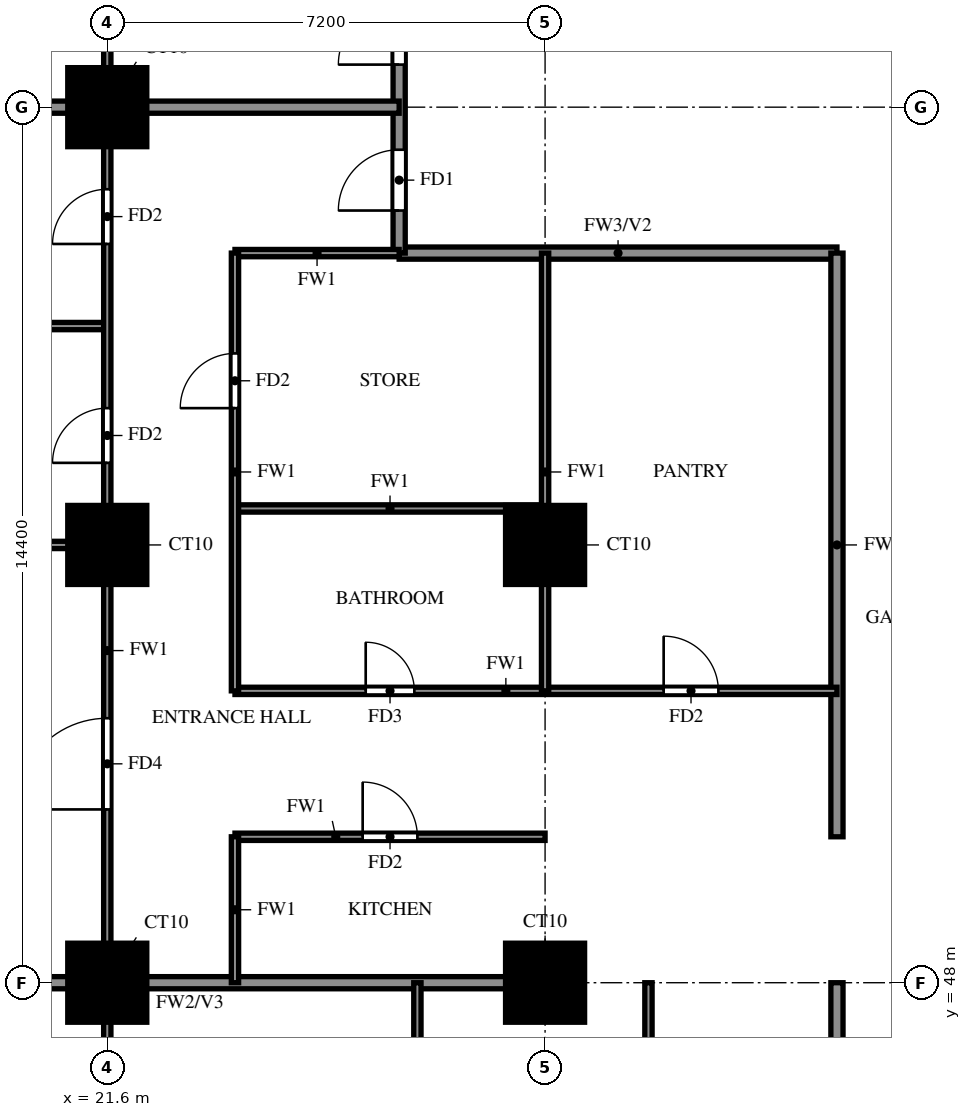
"""IFC4 building model, lengths in metres.
Left out: names, types, materials, properties, quantities, classifications, styles, units other than length and angle.
Written with IfcOpenShell. Run it as: python <this file> out.ifc"""

import sys

from ifc_helpers import new_model, si_unit, direction, frame, frame_2d, origin, origin_2d, place, context, subcontext, project, spatial, rectangle, extrude, source, transform, mapped, element, fill, save


model = new_model("IFC4")
c1 = context("Model", 3, precision=1e-05, world=origin(), true_north=direction((0.0, 1.0)))
c2 = subcontext(c1, "Body", "Model", "MODEL_VIEW")
j1 = project(units=[si_unit("LENGTHUNIT", "METRE"), si_unit("PLANEANGLEUNIT", "RADIAN")], contexts=[c1])
p1 = place(None, origin())
s1 = spatial("IfcSite", under=j1, at=p1, CompositionType="ELEMENT")
p2 = place(p1, origin())
s2 = spatial("IfcBuilding", under=s1, at=p2, CompositionType="ELEMENT")
p3 = place(p2, frame((0.0, 0.0, 72.5)))
s3 = spatial("IfcBuildingStorey", under=s2, at=p3, CompositionType="ELEMENT", Elevation=72.5)
m1 = source(origin(), c2, "Body", "SweptSolid", [
    extrude(rectangle(XDim=1.3, YDim=1.3, at=origin_2d()), origin(), (0.0, 0.0, 1.0), 3.18),
])
for number, where, z_axis, x_axis in (
    (1, (21.6, 48.0, 0.0), (0.0, 0.0, 1.0), (1.0, 0.0, 0.0)),
    (2, (28.8, 48.0, 0.0), (0.0, 0.0, 1.0), (1.0, 0.0, 0.0)),
    (3, (21.6, 55.2, 0.0), (0.0, 0.0, 1.0), (1.0, 0.0, 0.0)),
    (4, (28.8, 55.2, 0.0), (0.0, 0.0, 1.0), (1.0, 0.0, 0.0)),
    (5, (21.6, 62.4, 0.0), (0.0, 0.0, 1.0), (1.0, 0.0, 0.0)),
):
    element("IfcColumn", number, at=place(p3, frame(where, z_axis=z_axis, x_axis=x_axis)), inside=s3, PredefinedType="COLUMN", context=c2, shape_type="MappedRepresentation", body=[
        mapped(m1, transform((0.0, 0.0, 0.0))),
    ])
p4 = place(p3, frame((26.4, 60.0, 0.0), z_axis=(0.0, 0.0, 1.0), x_axis=(1.0, 0.0, 0.0)))
e6 = element("IfcWall", 6, at=p4, inside=s3, PredefinedType="SOLIDWALL", context=c2, shape_type="SweptSolid", body=[
    extrude(rectangle(XDim=7.2, YDim=0.2, at=frame_2d((3.6, 0.0))), origin(), (0.0, 0.0, 1.0), 3.18),
])
p5 = place(p3, frame((26.4, 60.0, 0.0), z_axis=(0.0, 0.0, 1.0), x_axis=(0.0, 1.0, 0.0)))
e7 = element("IfcWall", 7, at=p5, inside=s3, PredefinedType="SOLIDWALL", context=c2, shape_type="SweptSolid", body=[
    extrude(rectangle(XDim=9.45, YDim=0.2, at=frame_2d((4.725, 0.0))), origin(), (0.0, 0.0, 1.0), 3.18),
])
p6 = place(p5, frame((0.7, 0.0, 0.0)))
e8 = element("IfcOpeningElement", 8, at=p6, cuts=e7, PredefinedType="OPENING", context=c2, shape_type="SweptSolid", body=[
    extrude(rectangle(XDim=1.0, YDim=2.1, at=frame_2d((0.5, 1.05))), frame((0.0, 0.11, 0.0), z_axis=(0.0, -1.0, 0.0), x_axis=(1.0, 0.0, 0.0)), (0.0, 0.0, 1.0), 0.22),
])
p7 = place(p5, frame((3.1, 0.0, 0.0)))
e9 = element("IfcOpeningElement", 9, at=p7, cuts=e7, PredefinedType="OPENING", context=c2, shape_type="SweptSolid", body=[
    extrude(rectangle(XDim=1.0, YDim=2.1, at=frame_2d((0.5, 1.05))), frame((0.0, 0.11, 0.0), z_axis=(0.0, -1.0, 0.0), x_axis=(1.0, 0.0, 0.0)), (0.0, 0.0, 1.0), 0.22),
])
p8 = place(p3, frame((33.6, 45.6, 0.0), z_axis=(0.0, 0.0, 1.0), x_axis=(0.0, 1.0, 0.0)))
e10 = element("IfcWall", 10, at=p8, inside=s3, PredefinedType="SOLIDWALL", context=c2, shape_type="SweptSolid", body=[
    extrude(rectangle(XDim=2.4, YDim=0.2, at=frame_2d((1.2, 0.0))), origin(), (0.0, 0.0, 1.0), 3.18),
])
p9 = place(p3, frame((33.6, 50.4, 0.0), z_axis=(0.0, 0.0, 1.0), x_axis=(0.0, 1.0, 0.0)))
e11 = element("IfcWall", 11, at=p9, inside=s3, PredefinedType="SOLIDWALL", context=c2, shape_type="SweptSolid", body=[
    extrude(rectangle(XDim=9.6, YDim=0.2, at=frame_2d((4.8, 0.0))), origin(), (0.0, 0.0, 1.0), 3.18),
])
p10 = place(p3, frame((14.525, 48.0, 0.0), z_axis=(0.0, 0.0, 1.0), x_axis=(1.0, 0.0, 0.0)))
e12 = element("IfcWall", 12, at=p10, inside=s3, PredefinedType="SOLIDWALL", context=c2, shape_type="SweptSolid", body=[
    extrude(rectangle(XDim=14.275, YDim=0.2, at=frame_2d((7.138, 0.0))), origin(), (0.0, 0.0, 1.0), 3.18),
])
p11 = place(p3, frame((14.525, 62.4, 0.0), z_axis=(0.0, 0.0, 1.0), x_axis=(1.0, 0.0, 0.0)))
e13 = element("IfcWall", 13, at=p11, inside=s3, PredefinedType="SOLIDWALL", context=c2, shape_type="SweptSolid", body=[
    extrude(rectangle(XDim=11.875, YDim=0.2, at=frame_2d((5.938, 0.0))), origin(), (0.0, 0.0, 1.0), 3.18),
])
p12 = place(p3, frame((23.7, 50.4, 0.0), z_axis=(0.0, 0.0, 1.0), x_axis=(1.0, 0.0, 0.0)))
e14 = element("IfcWall", 14, at=p12, inside=s3, PredefinedType="PARTITIONING", context=c2, shape_type="SweptSolid", body=[
    extrude(rectangle(XDim=5.1, YDim=0.12, at=frame_2d((2.55, 0.0))), origin(), (0.0, 0.0, 1.0), 3.18),
])
p13 = place(p12, frame((2.1, 0.0, 0.0)))
e15 = element("IfcOpeningElement", 15, at=p13, cuts=e14, PredefinedType="OPENING", context=c2, shape_type="SweptSolid", body=[
    extrude(rectangle(XDim=0.9, YDim=2.1, at=frame_2d((0.45, 1.05))), frame((0.0, 0.07, 0.0), z_axis=(0.0, -1.0, 0.0), x_axis=(1.0, 0.0, 0.0)), (0.0, 0.0, 1.0), 0.14),
])
p14 = place(p3, frame((23.7, 52.8, 0.0), z_axis=(0.0, 0.0, 1.0), x_axis=(1.0, 0.0, 0.0)))
e16 = element("IfcWall", 16, at=p14, inside=s3, PredefinedType="PARTITIONING", context=c2, shape_type="SweptSolid", body=[
    extrude(rectangle(XDim=9.9, YDim=0.12, at=frame_2d((4.95, 0.0))), origin(), (0.0, 0.0, 1.0), 3.18),
])
p15 = place(p14, frame((2.15, 0.0, 0.0)))
e17 = element("IfcOpeningElement", 17, at=p15, cuts=e16, PredefinedType="OPENING", context=c2, shape_type="SweptSolid", body=[
    extrude(rectangle(XDim=0.8, YDim=2.1, at=frame_2d((0.4, 1.05))), frame((0.0, 0.07, 0.0), z_axis=(0.0, -1.0, 0.0), x_axis=(1.0, 0.0, 0.0)), (0.0, 0.0, 1.0), 0.14),
])
p16 = place(p14, frame((7.05, 0.0, 0.0)))
e18 = element("IfcOpeningElement", 18, at=p16, cuts=e16, PredefinedType="OPENING", context=c2, shape_type="SweptSolid", body=[
    extrude(rectangle(XDim=0.9, YDim=2.1, at=frame_2d((0.45, 1.05))), frame((0.0, 0.07, 0.0), z_axis=(0.0, -1.0, 0.0), x_axis=(1.0, 0.0, 0.0)), (0.0, 0.0, 1.0), 0.14),
])
p17 = place(p3, frame((14.525, 55.2, 0.0), z_axis=(0.0, 0.0, 1.0), x_axis=(1.0, 0.0, 0.0)))
e19 = element("IfcWall", 19, at=p17, inside=s3, PredefinedType="PARTITIONING", context=c2, shape_type="SweptSolid", body=[
    extrude(rectangle(XDim=7.075, YDim=0.12, at=frame_2d((3.538, 0.0))), origin(), (0.0, 0.0, 1.0), 3.18),
])
p18 = place(p3, frame((23.7, 55.8, 0.0), z_axis=(0.0, 0.0, 1.0), x_axis=(1.0, 0.0, 0.0)))
e20 = element("IfcWall", 20, at=p18, inside=s3, PredefinedType="PARTITIONING", context=c2, shape_type="SweptSolid", body=[
    extrude(rectangle(XDim=5.1, YDim=0.12, at=frame_2d((2.55, 0.0))), origin(), (0.0, 0.0, 1.0), 3.18),
])
p19 = place(p3, frame((14.525, 58.8, 0.0), z_axis=(0.0, 0.0, 1.0), x_axis=(1.0, 0.0, 0.0)))
e21 = element("IfcWall", 21, at=p19, inside=s3, PredefinedType="PARTITIONING", context=c2, shape_type="SweptSolid", body=[
    extrude(rectangle(XDim=7.075, YDim=0.12, at=frame_2d((3.538, 0.0))), origin(), (0.0, 0.0, 1.0), 2.28),
])
p20 = place(p3, frame((23.7, 60.0, 0.0), z_axis=(0.0, 0.0, 1.0), x_axis=(1.0, 0.0, 0.0)))
e22 = element("IfcWall", 22, at=p20, inside=s3, PredefinedType="PARTITIONING", context=c2, shape_type="SweptSolid", body=[
    extrude(rectangle(XDim=2.7, YDim=0.12, at=frame_2d((1.35, 0.0))), origin(), (0.0, 0.0, 1.0), 3.18),
])
p21 = place(p3, frame((21.6, 33.725, 0.0), z_axis=(0.0, 0.0, 1.0), x_axis=(0.0, 1.0, 0.0)))
e23 = element("IfcWall", 23, at=p21, inside=s3, PredefinedType="PARTITIONING", context=c2, shape_type="SweptSolid", body=[
    extrude(rectangle(XDim=39.475, YDim=0.12, at=frame_2d((19.737, 0.0))), origin(), (0.0, 0.0, 1.0), 3.18),
])
p22 = place(p21, frame((7.775, 0.0, 0.0)))
e24 = element("IfcOpeningElement", 24, at=p22, cuts=e23, PredefinedType="OPENING", context=c2, shape_type="SweptSolid", body=[
    extrude(rectangle(XDim=0.9, YDim=2.1, at=frame_2d((0.45, 1.05))), frame((0.0, 0.07, 0.0), z_axis=(0.0, -1.0, 0.0), x_axis=(1.0, 0.0, 0.0)), (0.0, 0.0, 1.0), 0.14),
])
p23 = place(p21, frame((17.125, 0.0, 0.0)))
e25 = element("IfcOpeningElement", 25, at=p23, cuts=e23, PredefinedType="OPENING", context=c2, shape_type="SweptSolid", body=[
    extrude(rectangle(XDim=1.5, YDim=2.1, at=frame_2d((0.75, 1.05))), frame((0.0, 0.07, 0.0), z_axis=(0.0, -1.0, 0.0), x_axis=(1.0, 0.0, 0.0)), (0.0, 0.0, 1.0), 0.14),
])
p24 = place(p21, frame((22.825, 0.0, 0.0)))
e26 = element("IfcOpeningElement", 26, at=p24, cuts=e23, PredefinedType="OPENING", context=c2, shape_type="SweptSolid", body=[
    extrude(rectangle(XDim=0.9, YDim=2.1, at=frame_2d((0.45, 1.05))), frame((0.0, 0.07, 0.0), z_axis=(0.0, -1.0, 0.0), x_axis=(1.0, 0.0, 0.0)), (0.0, 0.0, 1.0), 0.14),
])
p25 = place(p21, frame((26.425, 0.0, 0.0)))
e27 = element("IfcOpeningElement", 27, at=p25, cuts=e23, PredefinedType="OPENING", context=c2, shape_type="SweptSolid", body=[
    extrude(rectangle(XDim=0.9, YDim=2.1, at=frame_2d((0.45, 1.05))), frame((0.0, 0.07, 0.0), z_axis=(0.0, -1.0, 0.0), x_axis=(1.0, 0.0, 0.0)), (0.0, 0.0, 1.0), 0.14),
])
p26 = place(p21, frame((30.025, 0.0, 0.0)))
e28 = element("IfcOpeningElement", 28, at=p26, cuts=e23, PredefinedType="OPENING", context=c2, shape_type="SweptSolid", body=[
    extrude(rectangle(XDim=0.9, YDim=2.1, at=frame_2d((0.45, 1.05))), frame((0.0, 0.07, 0.0), z_axis=(0.0, -1.0, 0.0), x_axis=(1.0, 0.0, 0.0)), (0.0, 0.0, 1.0), 0.14),
])
p27 = place(p21, frame((33.625, 0.0, 0.0)))
e29 = element("IfcOpeningElement", 29, at=p27, cuts=e23, PredefinedType="OPENING", context=c2, shape_type="SweptSolid", body=[
    extrude(rectangle(XDim=0.9, YDim=2.1, at=frame_2d((0.45, 1.05))), frame((0.0, 0.07, 0.0), z_axis=(0.0, -1.0, 0.0), x_axis=(1.0, 0.0, 0.0)), (0.0, 0.0, 1.0), 0.14),
])
p28 = place(p21, frame((37.225, 0.0, 0.0)))
e30 = element("IfcOpeningElement", 30, at=p28, cuts=e23, PredefinedType="OPENING", context=c2, shape_type="SweptSolid", body=[
    extrude(rectangle(XDim=0.9, YDim=2.1, at=frame_2d((0.45, 1.05))), frame((0.0, 0.07, 0.0), z_axis=(0.0, -1.0, 0.0), x_axis=(1.0, 0.0, 0.0)), (0.0, 0.0, 1.0), 0.14),
])
p29 = place(p3, frame((23.7, 48.0, 0.0), z_axis=(0.0, 0.0, 1.0), x_axis=(0.0, 1.0, 0.0)))
e31 = element("IfcWall", 31, at=p29, inside=s3, PredefinedType="PARTITIONING", context=c2, shape_type="SweptSolid", body=[
    extrude(rectangle(XDim=2.4, YDim=0.12, at=frame_2d((1.2, 0.0))), origin(), (0.0, 0.0, 1.0), 3.18),
])
p30 = place(p3, frame((23.7, 52.8, 0.0), z_axis=(0.0, 0.0, 1.0), x_axis=(0.0, 1.0, 0.0)))
e32 = element("IfcWall", 32, at=p30, inside=s3, PredefinedType="PARTITIONING", context=c2, shape_type="SweptSolid", body=[
    extrude(rectangle(XDim=7.2, YDim=0.12, at=frame_2d((3.6, 0.0))), origin(), (0.0, 0.0, 1.0), 3.18),
])
p31 = place(p30, frame((4.65, 0.0, 0.0)))
e33 = element("IfcOpeningElement", 33, at=p31, cuts=e32, PredefinedType="OPENING", context=c2, shape_type="SweptSolid", body=[
    extrude(rectangle(XDim=0.9, YDim=2.1, at=frame_2d((0.45, 1.05))), frame((0.0, 0.07, 0.0), z_axis=(0.0, -1.0, 0.0), x_axis=(1.0, 0.0, 0.0)), (0.0, 0.0, 1.0), 0.14),
])
p32 = place(p3, frame((26.7, 42.9, 0.0), z_axis=(0.0, 0.0, 1.0), x_axis=(0.0, 1.0, 0.0)))
e34 = element("IfcWall", 34, at=p32, inside=s3, PredefinedType="PARTITIONING", context=c2, shape_type="SweptSolid", body=[
    extrude(rectangle(XDim=5.1, YDim=0.12, at=frame_2d((2.55, 0.0))), origin(), (0.0, 0.0, 1.0), 3.18),
])
p33 = place(p3, frame((28.8, 52.8, 0.0), z_axis=(0.0, 0.0, 1.0), x_axis=(0.0, 1.0, 0.0)))
e35 = element("IfcWall", 35, at=p33, inside=s3, PredefinedType="PARTITIONING", context=c2, shape_type="SweptSolid", body=[
    extrude(rectangle(XDim=7.2, YDim=0.12, at=frame_2d((3.6, 0.0))), origin(), (0.0, 0.0, 1.0), 3.18),
])
p34 = place(p3, frame((30.5, 42.9, 0.0), z_axis=(0.0, 0.0, 1.0), x_axis=(0.0, 1.0, 0.0)))
e36 = element("IfcWall", 36, at=p34, inside=s3, PredefinedType="PARTITIONING", context=c2, shape_type="SweptSolid", body=[
    extrude(rectangle(XDim=5.1, YDim=0.12, at=frame_2d((2.55, 0.0))), origin(), (0.0, 0.0, 1.0), 3.18),
])
p35 = place(p6, origin())
e37 = element("IfcDoor", 37, at=p35, inside=s3, OperationType="SINGLE_SWING_RIGHT", PredefinedType="DOOR", context=c2, shape_type="SweptSolid", body=[
    extrude(rectangle(XDim=1.0, YDim=2.1, at=frame_2d((0.5, 1.05))), frame((0.0, 0.025, 0.0), z_axis=(0.0, -1.0, 0.0), x_axis=(1.0, 0.0, 0.0)), (0.0, 0.0, 1.0), 0.05),
])
fill(e8, e37)
p36 = place(p23, origin())
e38 = element("IfcDoor", 38, at=p36, inside=s3, OperationType="SINGLE_SWING_LEFT", PredefinedType="DOOR", context=c2, shape_type="SweptSolid", body=[
    extrude(rectangle(XDim=1.5, YDim=2.1, at=frame_2d((0.75, 1.05))), frame((0.0, 0.025, 0.0), z_axis=(0.0, -1.0, 0.0), x_axis=(1.0, 0.0, 0.0)), (0.0, 0.0, 1.0), 0.05),
])
fill(e25, e38)
p37 = place(p24, origin())
e39 = element("IfcDoor", 39, at=p37, inside=s3, OperationType="SINGLE_SWING_LEFT", PredefinedType="DOOR", context=c2, shape_type="SweptSolid", body=[
    extrude(rectangle(XDim=0.9, YDim=2.1, at=frame_2d((0.45, 1.05))), frame((0.0, 0.025, 0.0), z_axis=(0.0, -1.0, 0.0), x_axis=(1.0, 0.0, 0.0)), (0.0, 0.0, 1.0), 0.05),
])
fill(e26, e39)
p38 = place(p25, origin())
e40 = element("IfcDoor", 40, at=p38, inside=s3, OperationType="SINGLE_SWING_RIGHT", PredefinedType="DOOR", context=c2, shape_type="SweptSolid", body=[
    extrude(rectangle(XDim=0.9, YDim=2.1, at=frame_2d((0.45, 1.05))), frame((0.0, 0.025, 0.0), z_axis=(0.0, -1.0, 0.0), x_axis=(1.0, 0.0, 0.0)), (0.0, 0.0, 1.0), 0.05),
])
fill(e27, e40)
p39 = place(p13, origin())
e41 = element("IfcDoor", 41, at=p39, inside=s3, OperationType="SINGLE_SWING_LEFT", PredefinedType="DOOR", context=c2, shape_type="SweptSolid", body=[
    extrude(rectangle(XDim=0.9, YDim=2.1, at=frame_2d((0.45, 1.05))), frame((0.0, 0.025, 0.0), z_axis=(0.0, -1.0, 0.0), x_axis=(1.0, 0.0, 0.0)), (0.0, 0.0, 1.0), 0.05),
])
fill(e15, e41)
p40 = place(p15, origin())
e42 = element("IfcDoor", 42, at=p40, inside=s3, OperationType="SINGLE_SWING_LEFT", PredefinedType="DOOR", context=c2, shape_type="SweptSolid", body=[
    extrude(rectangle(XDim=0.8, YDim=2.1, at=frame_2d((0.4, 1.05))), frame((0.0, 0.025, 0.0), z_axis=(0.0, -1.0, 0.0), x_axis=(1.0, 0.0, 0.0)), (0.0, 0.0, 1.0), 0.05),
])
fill(e17, e42)
p41 = place(p31, origin())
e43 = element("IfcDoor", 43, at=p41, inside=s3, OperationType="SINGLE_SWING_RIGHT", PredefinedType="DOOR", context=c2, shape_type="SweptSolid", body=[
    extrude(rectangle(XDim=0.9, YDim=2.1, at=frame_2d((0.45, 1.05))), frame((0.0, 0.025, 0.0), z_axis=(0.0, -1.0, 0.0), x_axis=(1.0, 0.0, 0.0)), (0.0, 0.0, 1.0), 0.05),
])
fill(e33, e43)
p42 = place(p16, origin())
e44 = element("IfcDoor", 44, at=p42, inside=s3, OperationType="SINGLE_SWING_LEFT", PredefinedType="DOOR", context=c2, shape_type="SweptSolid", body=[
    extrude(rectangle(XDim=0.9, YDim=2.1, at=frame_2d((0.45, 1.05))), frame((0.0, 0.025, 0.0), z_axis=(0.0, -1.0, 0.0), x_axis=(1.0, 0.0, 0.0)), (0.0, 0.0, 1.0), 0.05),
])
fill(e18, e44)
p43 = place(p7, origin())
e45 = element("IfcDoor", 45, at=p43, inside=s3, OperationType="SINGLE_SWING_LEFT", PredefinedType="DOOR", context=c2, shape_type="SweptSolid", body=[
    extrude(rectangle(XDim=1.0, YDim=2.1, at=frame_2d((0.5, 1.05))), frame((0.0, 0.025, 0.0), z_axis=(0.0, -1.0, 0.0), x_axis=(1.0, 0.0, 0.0)), (0.0, 0.0, 1.0), 0.05),
])
fill(e9, e45)
save(model, sys.argv[1])
